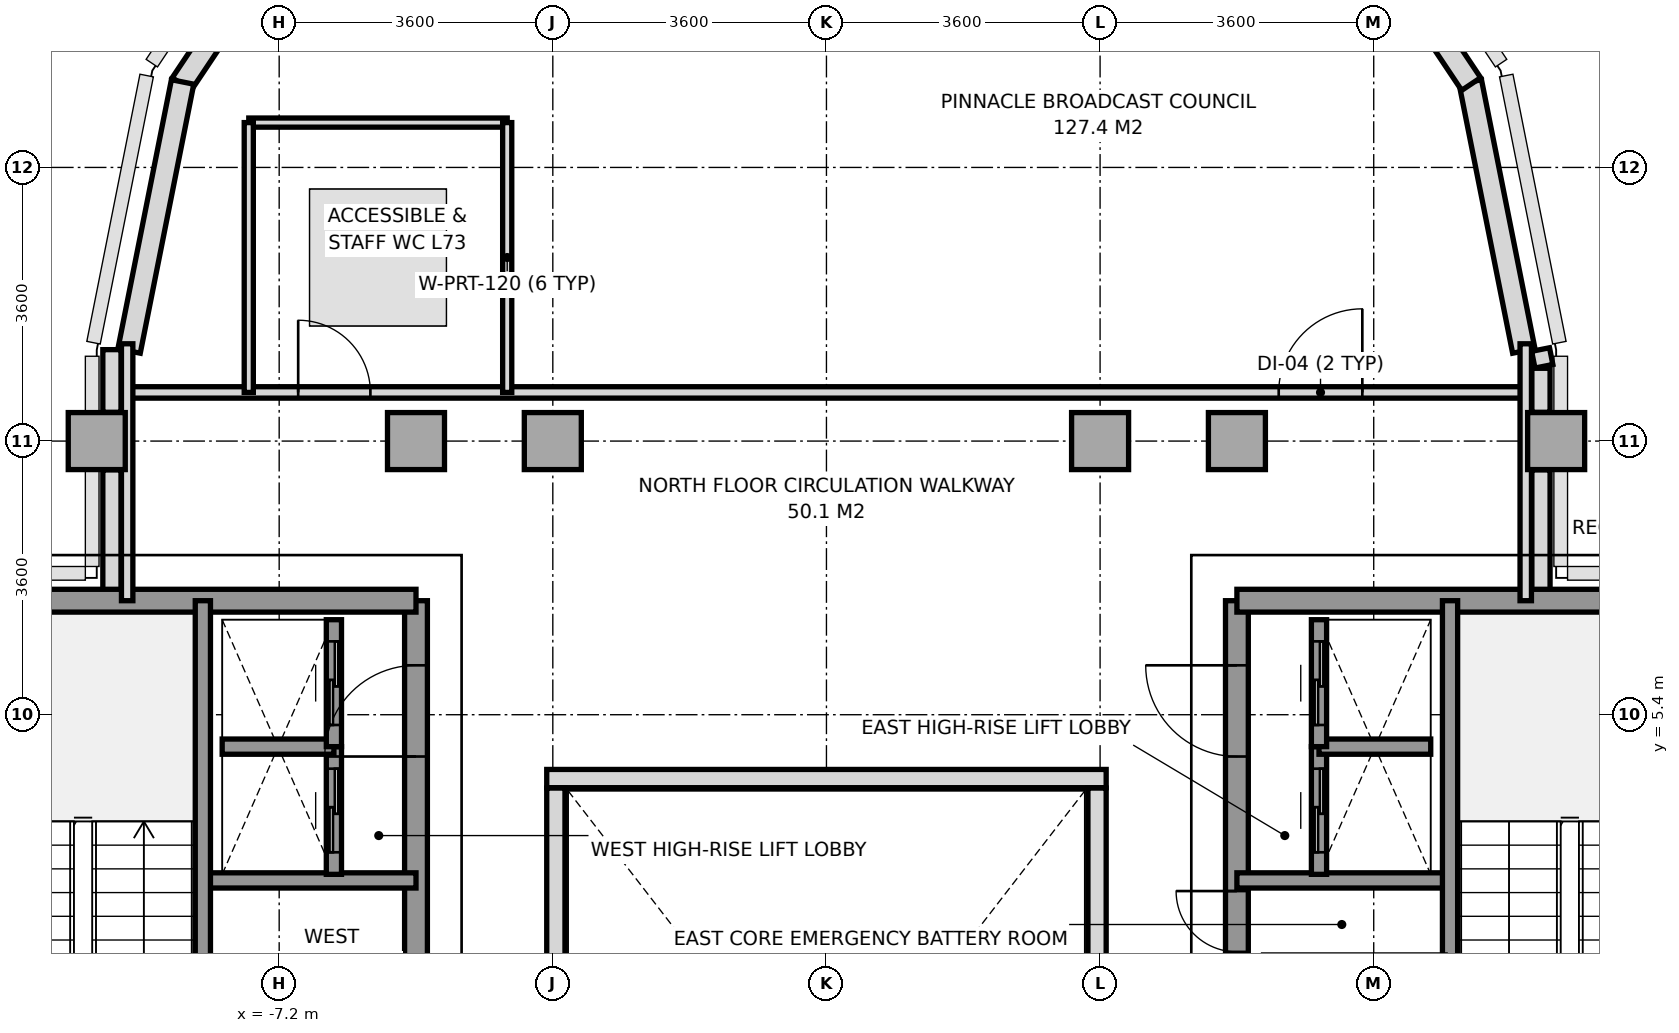
"""IFC4 building model, lengths in metres.
Left out: names, types, materials, properties, quantities, classifications, styles, units other than length and angle.
Written with IfcOpenShell. Run it as: python <this file> out.ifc"""

import sys

from ifc_helpers import new_model, si_unit, direction, frame, frame_2d, origin, origin_2d, place, context, subcontext, project, spatial, rectangle, extrude, source, transform, mapped, element, fill, save


model = new_model("IFC4")
c1 = context("Model", 3, precision=1e-05, world=origin(), true_north=direction((0.0, 1.0)))
c2 = subcontext(c1, "Body", "Model", "MODEL_VIEW")
j1 = project(units=[si_unit("LENGTHUNIT", "METRE"), si_unit("PLANEANGLEUNIT", "RADIAN")], contexts=[c1])
p1 = place(None, origin())
s1 = spatial("IfcSite", under=j1, at=p1, CompositionType="ELEMENT")
p2 = place(p1, origin())
s2 = spatial("IfcBuilding", under=s1, at=p2, CompositionType="ELEMENT")
p3 = place(p2, frame((0.0, 0.0, 262.0)))
s3 = spatial("IfcBuildingStorey", under=s2, at=p3, CompositionType="ELEMENT", Elevation=262.0)
m1 = source(origin(), c2, "Body", "SweptSolid", [
    extrude(rectangle(XDim=0.75, YDim=0.75, at=origin_2d()), origin(), (0.0, 0.0, 1.0), 3.01),
])
for number, where, z_axis, x_axis in (
    (1, (-9.6, 9.0, 0.0), (0.0, 0.0, 1.0), (1.0, 0.0, 0.0)),
    (2, (-5.4, 9.0, 0.0), (0.0, 0.0, 1.0), (1.0, 0.0, 0.0)),
    (3, (-3.6, 9.0, 0.0), (0.0, 0.0, 1.0), (1.0, 0.0, 0.0)),
    (4, (3.6, 9.0, 0.0), (0.0, 0.0, 1.0), (1.0, 0.0, 0.0)),
    (5, (5.4, 9.0, 0.0), (0.0, 0.0, 1.0), (1.0, 0.0, 0.0)),
    (6, (9.6, 9.0, 0.0), (0.0, 0.0, 1.0), (1.0, 0.0, 0.0)),
):
    element("IfcColumn", number, at=place(p3, frame(where, z_axis=z_axis, x_axis=x_axis)), inside=s3, PredefinedType="COLUMN", context=c2, shape_type="MappedRepresentation", body=[
        mapped(m1, transform((0.0, 0.0, 0.0), x_axis=(1.0, 0.0, 0.0), y_axis=(0.0, 1.0, 0.0), z_axis=(0.0, 0.0, 1.0), scale=1.0)),
    ])
p4 = place(p3, frame((9.175, 10.185, 0.0), z_axis=(0.0, 0.0, 1.0), x_axis=(-0.195114232679, 0.980780523974, 0.0)))
e7 = element("IfcWall", 7, at=p4, inside=s3, PredefinedType="SOLIDWALL", context=c2, shape_type="SweptSolid", body=[
    extrude(rectangle(XDim=3.609, YDim=0.3, at=frame_2d((1.804, 0.0))), origin(), (0.0, 0.0, 1.0), 3.01),
])
for number, where, z_axis, x_axis in (
    (8, (8.482, 13.698, 0.0), (0.0, 0.0, 1.0), (-0.556, 0.831, 0.0)),
    (9, (-7.305, 15.458, 0.0), (0.0, 0.0, 1.0), (-0.556, -0.831, 0.0)),
):
    element("IfcWall", number, at=place(p3, frame(where, z_axis=z_axis, x_axis=x_axis)), inside=s3, PredefinedType="SOLIDWALL", context=c2, shape_type="SweptSolid", body=[
        extrude(rectangle(XDim=2.118, YDim=0.3, at=frame_2d((1.059, 0.0))), origin(), (0.0, 0.0, 1.0), 2.61),
    ])
p5 = place(p3, frame((-8.471, 13.725, 0.0), z_axis=(0.0, 0.0, 1.0), x_axis=(-0.195114232679, -0.980780523974, 0.0)))
e10 = element("IfcWall", 10, at=p5, inside=s3, PredefinedType="SOLIDWALL", context=c2, shape_type="SweptSolid", body=[
    extrude(rectangle(XDim=3.609, YDim=0.3, at=frame_2d((1.804, 0.0))), origin(), (0.0, 0.0, 1.0), 3.01),
])
p6 = place(p3, frame((-9.4, 6.953, 0.0), z_axis=(0.0, 0.0, 1.0), x_axis=(0.0, 1.0, 0.0)))
e11 = element("IfcWall", 11, at=p6, inside=s3, PredefinedType="PARAPET", context=c2, shape_type="SweptSolid", body=[
    extrude(rectangle(XDim=1.669, YDim=0.24, at=frame_2d((0.834, 0.0))), origin(), (0.0, 0.0, 1.0), 1.15),
])
p7 = place(p3, frame((-9.4, 9.378, 0.0), z_axis=(0.0, 0.0, 1.0), x_axis=(0.0, 1.0, 0.0)))
e12 = element("IfcWall", 12, at=p7, inside=s3, PredefinedType="PARAPET", context=c2, shape_type="SweptSolid", body=[
    extrude(rectangle(XDim=0.825, YDim=0.24, at=frame_2d((0.413, 0.0))), origin(), (0.0, 0.0, 1.0), 1.15),
])
p8 = place(p3, frame((9.395, 10.204, 0.0), z_axis=(0.0, 0.0, 1.0), x_axis=(0.194859894132, -0.980831087221, 0.0)))
e13 = element("IfcWall", 13, at=p8, inside=s3, PredefinedType="PARAPET", context=c2, shape_type="SweptSolid", body=[
    extrude(rectangle(XDim=0.224, YDim=0.24, at=frame_2d((0.112, 0.0))), origin(), (0.0, 0.0, 1.0), 1.15),
])
p9 = place(p3, frame((9.4, 9.958, 0.0), z_axis=(0.0, 0.0, 1.0), x_axis=(0.0, -1.0, 0.0)))
e14 = element("IfcWall", 14, at=p9, inside=s3, PredefinedType="PARAPET", context=c2, shape_type="SweptSolid", body=[
    extrude(rectangle(XDim=0.58, YDim=0.24, at=frame_2d((0.29, 0.0))), origin(), (0.0, 0.0, 1.0), 1.15),
])
p10 = place(p3, frame((9.4, 8.622, 0.0), z_axis=(0.0, 0.0, 1.0), x_axis=(0.0, -1.0, 0.0)))
e15 = element("IfcWall", 15, at=p10, inside=s3, PredefinedType="PARAPET", context=c2, shape_type="SweptSolid", body=[
    extrude(rectangle(XDim=1.669, YDim=0.24, at=frame_2d((0.834, 0.0))), origin(), (0.0, 0.0, 1.0), 1.15),
])
p11 = place(p3, frame((-5.4, -5.6, 0.0), z_axis=(0.0, 0.0, 1.0), x_axis=(0.0, 1.0, 0.0)))
e16 = element("IfcWall", 16, at=p11, inside=s3, PredefinedType="SHEAR", context=c2, shape_type="SweptSolid", body=[
    extrude(rectangle(XDim=12.5, YDim=0.3, at=frame_2d((6.25, 0.0))), origin(), (0.0, 0.0, 1.0), 3.01),
])
p12 = place(p11, frame((4.55, 0.0, 0.0)))
e17 = element("IfcOpeningElement", 17, at=p12, cuts=e16, PredefinedType="OPENING", context=c2, shape_type="SweptSolid", body=[
    extrude(rectangle(XDim=1.2, YDim=2.2, at=frame_2d((0.6, 1.1))), frame((0.0, 0.16, 0.0), z_axis=(0.0, -1.0, 0.0), x_axis=(1.0, 0.0, 0.0)), (0.0, 0.0, 1.0), 0.32),
])
p13 = place(p11, frame((10.45, 0.0, 0.0)))
e18 = element("IfcOpeningElement", 18, at=p13, cuts=e16, PredefinedType="OPENING", context=c2, shape_type="SweptSolid", body=[
    extrude(rectangle(XDim=1.2, YDim=2.2, at=frame_2d((0.6, 1.1))), frame((0.0, 0.16, 0.0), z_axis=(0.0, -1.0, 0.0), x_axis=(1.0, 0.0, 0.0)), (0.0, 0.0, 1.0), 0.32),
])
p14 = place(p3, frame((-11.356, 6.9, 0.0), z_axis=(0.0, 0.0, 1.0), x_axis=(1.0, 0.0, 0.0)))
e19 = element("IfcWall", 19, at=p14, inside=s3, PredefinedType="SHEAR", context=c2, shape_type="SweptSolid", body=[
    extrude(rectangle(XDim=5.956, YDim=0.3, at=frame_2d((2.978, 0.0))), origin(), (0.0, 0.0, 1.0), 3.01),
])
p15 = place(p3, frame((-8.18, 3.22, 0.0), z_axis=(0.0, 0.0, 1.0), x_axis=(1.0, 0.0, 0.0)))
e20 = element("IfcWall", 20, at=p15, inside=s3, PredefinedType="SOLIDWALL", context=c2, shape_type="SweptSolid", body=[
    extrude(rectangle(XDim=2.78, YDim=0.2, at=frame_2d((1.39, 0.0))), origin(), (0.0, 0.0, 1.0), 3.01),
])
p16 = place(p3, frame((-8.204, -0.016, 0.0), z_axis=(0.0, 0.0, 1.0), x_axis=(0.0, 1.0, 0.0)))
e21 = element("IfcWall", 21, at=p16, inside=s3, PredefinedType="SOLIDWALL", context=c2, shape_type="SweptSolid", body=[
    extrude(rectangle(XDim=6.916, YDim=0.2, at=frame_2d((3.458, 0.0))), origin(), (0.0, 0.0, 1.0), 3.01),
])
p17 = place(p16, frame((0.2, 0.0, 0.0)))
e22 = element("IfcOpeningElement", 22, at=p17, cuts=e21, PredefinedType="OPENING", context=c2, shape_type="SweptSolid", body=[
    extrude(rectangle(XDim=1.2, YDim=2.2, at=frame_2d((0.6, 1.1))), frame((0.0, 0.11, 0.0), z_axis=(0.0, -1.0, 0.0), x_axis=(1.0, 0.0, 0.0)), (0.0, 0.0, 1.0), 0.22),
])
p18 = place(p3, frame((5.4, -5.6, 0.0), z_axis=(0.0, 0.0, 1.0), x_axis=(0.0, 1.0, 0.0)))
e23 = element("IfcWall", 23, at=p18, inside=s3, PredefinedType="SHEAR", context=c2, shape_type="SweptSolid", body=[
    extrude(rectangle(XDim=12.5, YDim=0.3, at=frame_2d((6.25, 0.0))), origin(), (0.0, 0.0, 1.0), 3.01),
])
p19 = place(p18, frame((4.55, 0.0, 0.0)))
e24 = element("IfcOpeningElement", 24, at=p19, cuts=e23, PredefinedType="OPENING", context=c2, shape_type="SweptSolid", body=[
    extrude(rectangle(XDim=1.2, YDim=2.2, at=frame_2d((0.6, 1.1))), frame((0.0, 0.16, 0.0), z_axis=(0.0, -1.0, 0.0), x_axis=(1.0, 0.0, 0.0)), (0.0, 0.0, 1.0), 0.32),
])
p20 = place(p18, frame((10.45, 0.0, 0.0)))
e25 = element("IfcOpeningElement", 25, at=p20, cuts=e23, PredefinedType="OPENING", context=c2, shape_type="SweptSolid", body=[
    extrude(rectangle(XDim=1.2, YDim=2.2, at=frame_2d((0.6, 1.1))), frame((0.0, 0.16, 0.0), z_axis=(0.0, -1.0, 0.0), x_axis=(1.0, 0.0, 0.0)), (0.0, 0.0, 1.0), 0.32),
])
p21 = place(p18, frame((7.88, 0.0, 0.0)))
e26 = element("IfcOpeningElement", 26, at=p21, cuts=e23, PredefinedType="OPENING", context=c2, shape_type="SweptSolid", body=[
    extrude(rectangle(XDim=0.8, YDim=2.1, at=frame_2d((0.4, 1.05))), frame((0.0, 0.16, 0.0), z_axis=(0.0, -1.0, 0.0), x_axis=(1.0, 0.0, 0.0)), (0.0, 0.0, 1.0), 0.32),
])
p22 = place(p3, frame((5.4, 6.9, 0.0), z_axis=(0.0, 0.0, 1.0), x_axis=(1.0, 0.0, 0.0)))
e27 = element("IfcWall", 27, at=p22, inside=s3, PredefinedType="SHEAR", context=c2, shape_type="SweptSolid", body=[
    extrude(rectangle(XDim=5.956, YDim=0.3, at=frame_2d((2.978, 0.0))), origin(), (0.0, 0.0, 1.0), 3.01),
])
p23 = place(p3, frame((5.4, 3.22, 0.0), z_axis=(0.0, 0.0, 1.0), x_axis=(1.0, 0.0, 0.0)))
e28 = element("IfcWall", 28, at=p23, inside=s3, PredefinedType="SOLIDWALL", context=c2, shape_type="SweptSolid", body=[
    extrude(rectangle(XDim=2.78, YDim=0.2, at=frame_2d((1.39, 0.0))), origin(), (0.0, 0.0, 1.0), 3.01),
])
p24 = place(p3, frame((8.204, -0.016, 0.0), z_axis=(0.0, 0.0, 1.0), x_axis=(0.0, 1.0, 0.0)))
e29 = element("IfcWall", 29, at=p24, inside=s3, PredefinedType="SOLIDWALL", context=c2, shape_type="SweptSolid", body=[
    extrude(rectangle(XDim=6.916, YDim=0.2, at=frame_2d((3.458, 0.0))), origin(), (0.0, 0.0, 1.0), 3.01),
])
p25 = place(p24, frame((0.2, 0.0, 0.0)))
e30 = element("IfcOpeningElement", 30, at=p25, cuts=e29, PredefinedType="OPENING", context=c2, shape_type="SweptSolid", body=[
    extrude(rectangle(XDim=1.2, YDim=2.2, at=frame_2d((0.6, 1.1))), frame((0.0, 0.11, 0.0), z_axis=(0.0, -1.0, 0.0), x_axis=(1.0, 0.0, 0.0)), (0.0, 0.0, 1.0), 0.22),
])
p26 = place(p3, frame((-6.48, 3.3, 0.0), z_axis=(0.0, 0.0, 1.0), x_axis=(0.0, 1.0, 0.0)))
e31 = element("IfcWall", 31, at=p26, inside=s3, PredefinedType="SOLIDWALL", context=c2, shape_type="SweptSolid", body=[
    extrude(rectangle(XDim=1.68, YDim=0.2, at=frame_2d((0.84, 0.0))), origin(), (0.0, 0.0, 1.0), 3.01),
])
p27 = place(p26, frame((0.29, 0.0, 0.0)))
e32 = element("IfcOpeningElement", 32, at=p27, cuts=e31, PredefinedType="OPENING", context=c2, shape_type="SweptSolid", body=[
    extrude(rectangle(XDim=1.1, YDim=2.2, at=frame_2d((0.55, 1.1))), frame((0.0, 0.11, 0.0), z_axis=(0.0, -1.0, 0.0), x_axis=(1.0, 0.0, 0.0)), (0.0, 0.0, 1.0), 0.22),
])
p28 = place(p3, frame((-7.95, 4.98, 0.0), z_axis=(0.0, 0.0, 1.0), x_axis=(1.0, 0.0, 0.0)))
e33 = element("IfcWall", 33, at=p28, inside=s3, PredefinedType="SOLIDWALL", context=c2, shape_type="SweptSolid", body=[
    extrude(rectangle(XDim=1.47, YDim=0.2, at=frame_2d((0.735, 0.0))), origin(), (0.0, 0.0, 1.0), 3.01),
])
p29 = place(p3, frame((-6.48, 4.98, 0.0), z_axis=(0.0, 0.0, 1.0), x_axis=(0.0, 1.0, 0.0)))
e34 = element("IfcWall", 34, at=p29, inside=s3, PredefinedType="SOLIDWALL", context=c2, shape_type="SweptSolid", body=[
    extrude(rectangle(XDim=1.67, YDim=0.2, at=frame_2d((0.835, 0.0))), origin(), (0.0, 0.0, 1.0), 3.01),
])
p30 = place(p29, frame((0.285, 0.0, 0.0)))
e35 = element("IfcOpeningElement", 35, at=p30, cuts=e34, PredefinedType="OPENING", context=c2, shape_type="SweptSolid", body=[
    extrude(rectangle(XDim=1.1, YDim=2.2, at=frame_2d((0.55, 1.1))), frame((0.0, 0.11, 0.0), z_axis=(0.0, -1.0, 0.0), x_axis=(1.0, 0.0, 0.0)), (0.0, 0.0, 1.0), 0.22),
])
p31 = place(p3, frame((6.48, 3.3, 0.0), z_axis=(0.0, 0.0, 1.0), x_axis=(0.0, 1.0, 0.0)))
e36 = element("IfcWall", 36, at=p31, inside=s3, PredefinedType="SOLIDWALL", context=c2, shape_type="SweptSolid", body=[
    extrude(rectangle(XDim=1.68, YDim=0.2, at=frame_2d((0.84, 0.0))), origin(), (0.0, 0.0, 1.0), 3.01),
])
p32 = place(p31, frame((0.29, 0.0, 0.0)))
e37 = element("IfcOpeningElement", 37, at=p32, cuts=e36, PredefinedType="OPENING", context=c2, shape_type="SweptSolid", body=[
    extrude(rectangle(XDim=1.1, YDim=2.2, at=frame_2d((0.55, 1.1))), frame((0.0, 0.11, 0.0), z_axis=(0.0, -1.0, 0.0), x_axis=(1.0, 0.0, 0.0)), (0.0, 0.0, 1.0), 0.22),
])
p33 = place(p3, frame((6.48, 4.98, 0.0), z_axis=(0.0, 0.0, 1.0), x_axis=(1.0, 0.0, 0.0)))
e38 = element("IfcWall", 38, at=p33, inside=s3, PredefinedType="SOLIDWALL", context=c2, shape_type="SweptSolid", body=[
    extrude(rectangle(XDim=1.47, YDim=0.2, at=frame_2d((0.735, 0.0))), origin(), (0.0, 0.0, 1.0), 3.01),
])
p34 = place(p3, frame((6.48, 4.98, 0.0), z_axis=(0.0, 0.0, 1.0), x_axis=(0.0, 1.0, 0.0)))
e39 = element("IfcWall", 39, at=p34, inside=s3, PredefinedType="SOLIDWALL", context=c2, shape_type="SweptSolid", body=[
    extrude(rectangle(XDim=1.67, YDim=0.2, at=frame_2d((0.835, 0.0))), origin(), (0.0, 0.0, 1.0), 3.01),
])
p35 = place(p34, frame((0.285, 0.0, 0.0)))
e40 = element("IfcOpeningElement", 40, at=p35, cuts=e39, PredefinedType="OPENING", context=c2, shape_type="SweptSolid", body=[
    extrude(rectangle(XDim=1.1, YDim=2.2, at=frame_2d((0.55, 1.1))), frame((0.0, 0.11, 0.0), z_axis=(0.0, -1.0, 0.0), x_axis=(1.0, 0.0, 0.0)), (0.0, 0.0, 1.0), 0.22),
])
p36 = place(p3, frame((-9.2, 9.64, 0.0), z_axis=(0.0, 0.0, 1.0), x_axis=(1.0, 0.0, 0.0)))
e41 = element("IfcWall", 41, at=p36, inside=s3, PredefinedType="PARTITIONING", context=c2, shape_type="SweptSolid", body=[
    extrude(rectangle(XDim=18.4, YDim=0.15, at=frame_2d((9.2, 0.0))), origin(), (0.0, 0.0, 1.0), 3.01),
])
p37 = place(p36, frame((2.25, 0.0, 0.0)))
e42 = element("IfcOpeningElement", 42, at=p37, cuts=e41, PredefinedType="OPENING", context=c2, shape_type="SweptSolid", body=[
    extrude(rectangle(XDim=0.95, YDim=2.15, at=frame_2d((0.475, 1.075))), frame((0.0, 0.085, 0.0), z_axis=(0.0, -1.0, 0.0), x_axis=(1.0, 0.0, 0.0)), (0.0, 0.0, 1.0), 0.17),
])
p38 = place(p36, frame((15.15, 0.0, 0.0)))
e43 = element("IfcOpeningElement", 43, at=p38, cuts=e41, PredefinedType="OPENING", context=c2, shape_type="SweptSolid", body=[
    extrude(rectangle(XDim=1.1, YDim=2.2, at=frame_2d((0.55, 1.1))), frame((0.0, 0.085, 0.0), z_axis=(0.0, -1.0, 0.0), x_axis=(1.0, 0.0, 0.0)), (0.0, 0.0, 1.0), 0.17),
])
for number, where, z_axis, x_axis in (
    (44, (-9.2, 6.9, 0.0), (0.0, 0.0, 1.0), (0.0, 1.0, 0.0)),
    (45, (9.2, 6.9, 0.0), (0.0, 0.0, 1.0), (0.0, 1.0, 0.0)),
):
    element("IfcWall", number, at=place(p3, frame(where, z_axis=z_axis, x_axis=x_axis)), inside=s3, PredefinedType="PARTITIONING", context=c2, shape_type="SweptSolid", body=[
        extrude(rectangle(XDim=3.38, YDim=0.15, at=frame_2d((1.69, 0.0))), origin(), (0.0, 0.0, 1.0), 2.61),
    ])
p39 = place(p3, frame((-7.6, 13.19, 0.0), z_axis=(0.0, 0.0, 1.0), x_axis=(1.0, 0.0, 0.0)))
e46 = element("IfcWall", 46, at=p39, inside=s3, PredefinedType="PARTITIONING", context=c2, shape_type="SweptSolid", body=[
    extrude(rectangle(XDim=3.4, YDim=0.12, at=frame_2d((1.7, 0.0))), origin(), (0.0, 0.0, 1.0), 3.01),
])
for number, where, z_axis, x_axis in (
    (47, (-7.6, 9.64, 0.0), (0.0, 0.0, 1.0), (0.0, 1.0, 0.0)),
    (48, (-4.2, 9.64, 0.0), (0.0, 0.0, 1.0), (0.0, 1.0, 0.0)),
):
    element("IfcWall", number, at=place(p3, frame(where, z_axis=z_axis, x_axis=x_axis)), inside=s3, PredefinedType="PARTITIONING", context=c2, shape_type="SweptSolid", body=[
        extrude(rectangle(XDim=3.55, YDim=0.12, at=frame_2d((1.775, 0.0))), origin(), (0.0, 0.0, 1.0), 3.01),
    ])
p40 = place(p3, frame((-3.68, 4.56, 0.0), z_axis=(0.0, 0.0, 1.0), x_axis=(1.0, 0.0, 0.0)))
e49 = element("IfcWall", 49, at=p40, inside=s3, PredefinedType="PARAPET", context=c2, shape_type="SweptSolid", body=[
    extrude(rectangle(XDim=7.36, YDim=0.24, at=frame_2d((3.68, 0.0))), origin(), (0.0, 0.0, 1.0), 1.15),
])
for number, where, z_axis, x_axis in (
    (50, (-3.56, -4.435, 0.0), (0.0, 0.0, 1.0), (0.0, 1.0, 0.0)),
    (51, (3.56, -4.435, 0.0), (0.0, 0.0, 1.0), (0.0, 1.0, 0.0)),
):
    element("IfcWall", number, at=place(p3, frame(where, z_axis=z_axis, x_axis=x_axis)), inside=s3, PredefinedType="PARAPET", context=c2, shape_type="SweptSolid", body=[
        extrude(rectangle(XDim=8.87, YDim=0.24, at=frame_2d((4.435, 0.0))), origin(), (0.0, 0.0, 1.0), 1.15),
    ])
m2 = source(origin(), c2, "Body", "SweptSolid", [
    extrude(rectangle(XDim=1.2, YDim=2.2, at=frame_2d((0.6, 1.1))), frame((0.0, 0.025, 0.0), z_axis=(0.0, -1.0, 0.0), x_axis=(1.0, 0.0, 0.0)), (0.0, 0.0, 1.0), 0.05),
])
p41 = place(p13, origin())
e52 = element("IfcDoor", 52, at=p41, inside=s3, OperationType="SINGLE_SWING_LEFT", PredefinedType="DOOR", context=c2, shape_type="MappedRepresentation", body=[
    mapped(m2, transform((0.0, 0.0, 0.0), x_axis=(1.0, 0.0, 0.0), y_axis=(0.0, 1.0, 0.0), z_axis=(0.0, 0.0, 1.0), scale=1.0)),
])
fill(e18, e52)
p42 = place(p20, origin())
e53 = element("IfcDoor", 53, at=p42, inside=s3, OperationType="SINGLE_SWING_RIGHT", PredefinedType="DOOR", context=c2, shape_type="MappedRepresentation", body=[
    mapped(m2, transform((0.0, 0.0, 0.0), x_axis=(1.0, 0.0, 0.0), y_axis=(0.0, 1.0, 0.0), z_axis=(0.0, 0.0, 1.0), scale=1.0)),
])
fill(e25, e53)
m3 = source(origin(), c2, "Body", "SweptSolid", [
    extrude(rectangle(XDim=0.8, YDim=2.1, at=frame_2d((0.4, 1.05))), frame((0.0, 0.025, 0.0), z_axis=(0.0, -1.0, 0.0), x_axis=(1.0, 0.0, 0.0)), (0.0, 0.0, 1.0), 0.05),
])
p43 = place(p21, origin())
e54 = element("IfcDoor", 54, at=p43, inside=s3, OperationType="SINGLE_SWING_RIGHT", PredefinedType="DOOR", context=c2, shape_type="MappedRepresentation", body=[
    mapped(m3, transform((0.0, 0.0, 0.0), x_axis=(1.0, 0.0, 0.0), y_axis=(0.0, 1.0, 0.0), z_axis=(0.0, 0.0, 1.0), scale=1.0)),
])
fill(e26, e54)
m4 = source(origin(), c2, "Body", "SweptSolid", [
    extrude(rectangle(XDim=1.1, YDim=2.2, at=frame_2d((0.55, 1.1))), frame((0.0, 0.025, 0.0), z_axis=(0.0, -1.0, 0.0), x_axis=(1.0, 0.0, 0.0)), (0.0, 0.0, 1.0), 0.05),
])
p44 = place(p27, origin())
e55 = element("IfcDoor", 55, at=p44, inside=s3, OperationType="SLIDING_TO_LEFT", PredefinedType="DOOR", context=c2, shape_type="MappedRepresentation", body=[
    mapped(m4, transform((0.0, 0.0, 0.0), x_axis=(1.0, 0.0, 0.0), y_axis=(0.0, 1.0, 0.0), z_axis=(0.0, 0.0, 1.0), scale=1.0)),
])
fill(e32, e55)
p45 = place(p30, origin())
e56 = element("IfcDoor", 56, at=p45, inside=s3, OperationType="SLIDING_TO_LEFT", PredefinedType="DOOR", context=c2, shape_type="MappedRepresentation", body=[
    mapped(m4, transform((0.0, 0.0, 0.0), x_axis=(1.0, 0.0, 0.0), y_axis=(0.0, 1.0, 0.0), z_axis=(0.0, 0.0, 1.0), scale=1.0)),
])
fill(e35, e56)
p46 = place(p32, origin())
e57 = element("IfcDoor", 57, at=p46, inside=s3, OperationType="SLIDING_TO_LEFT", PredefinedType="DOOR", context=c2, shape_type="MappedRepresentation", body=[
    mapped(m4, transform((0.0, 0.0, 0.0), x_axis=(1.0, 0.0, 0.0), y_axis=(0.0, 1.0, 0.0), z_axis=(0.0, 0.0, 1.0), scale=1.0)),
])
fill(e37, e57)
p47 = place(p35, origin())
e58 = element("IfcDoor", 58, at=p47, inside=s3, OperationType="SLIDING_TO_LEFT", PredefinedType="DOOR", context=c2, shape_type="MappedRepresentation", body=[
    mapped(m4, transform((0.0, 0.0, 0.0), x_axis=(1.0, 0.0, 0.0), y_axis=(0.0, 1.0, 0.0), z_axis=(0.0, 0.0, 1.0), scale=1.0)),
])
fill(e40, e58)
m5 = source(origin(), c2, "Body", "SweptSolid", [
    extrude(rectangle(XDim=0.95, YDim=2.15, at=frame_2d((0.475, 1.075))), frame((0.0, 0.025, 0.0), z_axis=(0.0, -1.0, 0.0), x_axis=(1.0, 0.0, 0.0)), (0.0, 0.0, 1.0), 0.05),
])
p48 = place(p37, origin())
e59 = element("IfcDoor", 59, at=p48, inside=s3, OperationType="SINGLE_SWING_LEFT", PredefinedType="DOOR", context=c2, shape_type="MappedRepresentation", body=[
    mapped(m5, transform((0.0, 0.0, 0.0), x_axis=(1.0, 0.0, 0.0), y_axis=(0.0, 1.0, 0.0), z_axis=(0.0, 0.0, 1.0), scale=1.0)),
])
fill(e42, e59)
p49 = place(p38, origin())
e60 = element("IfcDoor", 60, at=p49, inside=s3, OperationType="SINGLE_SWING_RIGHT", PredefinedType="DOOR", context=c2, shape_type="MappedRepresentation", body=[
    mapped(m4, transform((0.0, 0.0, 0.0), x_axis=(1.0, 0.0, 0.0), y_axis=(0.0, 1.0, 0.0), z_axis=(0.0, 0.0, 1.0), scale=1.0)),
])
fill(e43, e60)
save(model, sys.argv[1])
